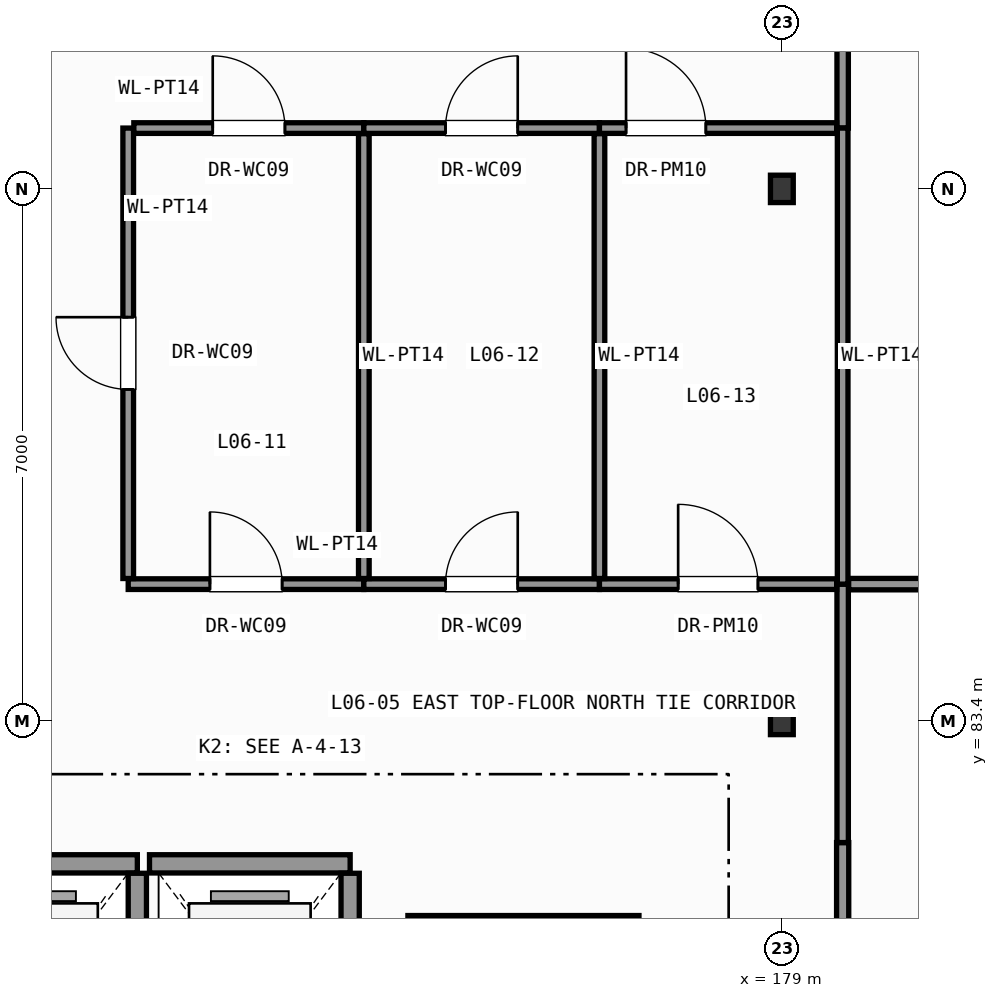
"""IFC4 building model, lengths in metres.
Left out: names, types, materials, properties, quantities, classifications, styles, units other than length and angle.
Written with IfcOpenShell. Run it as: python <this file> out.ifc"""

import sys

from ifc_helpers import new_model, si_unit, direction, frame, frame_2d, origin, origin_2d, place, context, subcontext, project, spatial, rectangle, i_section, extrude, element, fill, save


model = new_model("IFC4")
c1 = context("Model", 3, precision=1e-05, world=origin(), true_north=direction((0.0, 1.0)))
c2 = subcontext(c1, "Body", "Model", "MODEL_VIEW")
j1 = project(units=[si_unit("LENGTHUNIT", "METRE"), si_unit("PLANEANGLEUNIT", "RADIAN")], contexts=[c1])
p1 = place(None, origin())
s1 = spatial("IfcSite", under=j1, at=p1, CompositionType="ELEMENT")
p2 = place(p1, origin())
s2 = spatial("IfcBuilding", under=s1, at=p2, CompositionType="ELEMENT")
p3 = place(p2, frame((0.0, 0.0, 26.4)))
s3 = spatial("IfcBuildingStorey", under=s2, at=p3, CompositionType="ELEMENT", Elevation=26.4)
for number, where, z_axis, x_axis in (
    (1, (179.0, 83.4, 0.0), (0.0, 0.0, 1.0), (1.0, 0.0, 0.0)),
    (2, (179.0, 90.4, 0.0), (0.0, 0.0, 1.0), (1.0, 0.0, 0.0)),
):
    element("IfcColumn", number, at=place(p3, frame(where, z_axis=z_axis, x_axis=x_axis)), inside=s3, PredefinedType="COLUMN", context=c2, shape_type="SweptSolid", body=[
        extrude(i_section(OverallWidth=0.3, OverallDepth=0.36, WebThickness=0.012, FlangeThickness=0.022, FilletRadius=0.027, at=origin_2d()), origin(), (0.0, 0.0, 1.0), 4.2),
    ])
p4 = place(p3, frame((167.88, 81.52, 0.0), z_axis=(0.0, 0.0, 1.0), x_axis=(1.0, 0.0, 0.0)))
e3 = element("IfcWall", 3, at=p4, inside=s3, PredefinedType="SHEAR", context=c2, shape_type="SweptSolid", body=[
    extrude(rectangle(XDim=2.64, YDim=0.24, at=frame_2d((1.32, 0.0))), origin(), (0.0, 0.0, 1.0), 4.0),
])
p5 = place(p3, frame((170.52, 78.204, 0.0), z_axis=(0.0, 0.0, 1.0), x_axis=(0.0, 1.0, 0.0)))
e4 = element("IfcWall", 4, at=p5, inside=s3, PredefinedType="SHEAR", context=c2, shape_type="SweptSolid", body=[
    extrude(rectangle(XDim=3.192, YDim=0.24, at=frame_2d((1.596, 0.0))), origin(), (0.0, 0.0, 1.0), 4.0),
])
p6 = place(p3, frame((170.68, 81.52, 0.0), z_axis=(0.0, 0.0, 1.0), x_axis=(1.0, 0.0, 0.0)))
e5 = element("IfcWall", 5, at=p6, inside=s3, PredefinedType="SHEAR", context=c2, shape_type="SweptSolid", body=[
    extrude(rectangle(XDim=2.64, YDim=0.24, at=frame_2d((1.32, 0.0))), origin(), (0.0, 0.0, 1.0), 4.0),
])
p7 = place(p3, frame((173.32, 78.204, 0.0), z_axis=(0.0, 0.0, 1.0), x_axis=(0.0, 1.0, 0.0)))
e6 = element("IfcWall", 6, at=p7, inside=s3, PredefinedType="SHEAR", context=c2, shape_type="SweptSolid", body=[
    extrude(rectangle(XDim=3.192, YDim=0.24, at=frame_2d((1.596, 0.0))), origin(), (0.0, 0.0, 1.0), 4.0),
])
p8 = place(p3, frame((174.08, 80.72, 0.0), z_axis=(0.0, 0.0, 1.0), x_axis=(1.0, 0.0, 0.0)))
e7 = element("IfcWall", 7, at=p8, inside=s3, PredefinedType="SHEAR", context=c2, shape_type="SweptSolid", body=[
    extrude(rectangle(XDim=3.04, YDim=0.24, at=frame_2d((1.52, 0.0))), origin(), (0.0, 0.0, 1.0), 4.0),
])
p9 = place(p3, frame((179.8, 73.5, 0.0), z_axis=(0.0, 0.0, 1.0), x_axis=(0.0, 1.0, 0.0)))
e8 = element("IfcWall", 8, at=p9, inside=s3, PredefinedType="PARTITIONING", context=c2, shape_type="SweptSolid", body=[
    extrude(rectangle(XDim=8.3, YDim=0.16, at=frame_2d((4.15, 0.0))), origin(), (0.0, 0.0, 1.0), 4.0),
])
p10 = place(p9, frame((4.31, 0.0, 0.0)))
e9 = element("IfcOpeningElement", 9, at=p10, cuts=e8, PredefinedType="OPENING", context=c2, shape_type="SweptSolid", body=[
    extrude(rectangle(XDim=2.2, YDim=2.6, at=frame_2d((1.1, 1.3))), frame((0.0, 0.09, 0.0), z_axis=(0.0, -1.0, 0.0), x_axis=(1.0, 0.0, 0.0)), (0.0, 0.0, 1.0), 0.18),
])
p11 = place(p3, frame((179.8, 81.8, 0.0), z_axis=(0.0, 0.0, 1.0), x_axis=(0.0, 1.0, 0.0)))
e10 = element("IfcWall", 10, at=p11, inside=s3, PredefinedType="PARTITIONING", context=c2, shape_type="SweptSolid", body=[
    extrude(rectangle(XDim=3.4, YDim=0.15, at=frame_2d((1.7, 0.0))), origin(), (0.0, 0.0, 1.0), 4.0),
])
p12 = place(p3, frame((170.4, 85.2, 0.0), z_axis=(0.0, 0.0, 1.0), x_axis=(1.0, 0.0, 0.0)))
e11 = element("IfcWall", 11, at=p12, inside=s3, PredefinedType="PARTITIONING", context=c2, shape_type="SweptSolid", body=[
    extrude(rectangle(XDim=3.1, YDim=0.14, at=frame_2d((1.55, 0.0))), origin(), (0.0, 0.0, 1.0), 4.0),
])
p13 = place(p12, frame((1.075, 0.0, 0.0)))
e12 = element("IfcOpeningElement", 12, at=p13, cuts=e11, PredefinedType="OPENING", context=c2, shape_type="SweptSolid", body=[
    extrude(rectangle(XDim=0.95, YDim=2.1, at=frame_2d((0.475, 1.05))), frame((0.0, 0.08, 0.0), z_axis=(0.0, -1.0, 0.0), x_axis=(1.0, 0.0, 0.0)), (0.0, 0.0, 1.0), 0.16),
])
p14 = place(p3, frame((173.5, 85.2, 0.0), z_axis=(0.0, 0.0, 1.0), x_axis=(1.0, 0.0, 0.0)))
e13 = element("IfcWall", 13, at=p14, inside=s3, PredefinedType="PARTITIONING", context=c2, shape_type="SweptSolid", body=[
    extrude(rectangle(XDim=3.1, YDim=0.14, at=frame_2d((1.55, 0.0))), origin(), (0.0, 0.0, 1.0), 4.0),
])
p15 = place(p14, frame((1.075, 0.0, 0.0)))
e14 = element("IfcOpeningElement", 14, at=p15, cuts=e13, PredefinedType="OPENING", context=c2, shape_type="SweptSolid", body=[
    extrude(rectangle(XDim=0.95, YDim=2.1, at=frame_2d((0.475, 1.05))), frame((0.0, 0.08, 0.0), z_axis=(0.0, -1.0, 0.0), x_axis=(1.0, 0.0, 0.0)), (0.0, 0.0, 1.0), 0.16),
])
p16 = place(p3, frame((176.6, 85.2, 0.0), z_axis=(0.0, 0.0, 1.0), x_axis=(1.0, 0.0, 0.0)))
e15 = element("IfcWall", 15, at=p16, inside=s3, PredefinedType="PARTITIONING", context=c2, shape_type="SweptSolid", body=[
    extrude(rectangle(XDim=3.121, YDim=0.14, at=frame_2d((1.561, 0.0))), origin(), (0.0, 0.0, 1.0), 4.0),
])
p17 = place(p16, frame((1.035, 0.0, 0.0)))
e16 = element("IfcOpeningElement", 16, at=p17, cuts=e15, PredefinedType="OPENING", context=c2, shape_type="SweptSolid", body=[
    extrude(rectangle(XDim=1.05, YDim=2.15, at=frame_2d((0.525, 1.075))), frame((0.0, 0.08, 0.0), z_axis=(0.0, -1.0, 0.0), x_axis=(1.0, 0.0, 0.0)), (0.0, 0.0, 1.0), 0.16),
])
p18 = place(p3, frame((170.4, 85.274, 0.0), z_axis=(0.0, 0.0, 1.0), x_axis=(0.0, 1.0, 0.0)))
e17 = element("IfcWall", 17, at=p18, inside=s3, PredefinedType="PARTITIONING", context=c2, shape_type="SweptSolid", body=[
    extrude(rectangle(XDim=5.926, YDim=0.14, at=frame_2d((2.963, 0.0))), origin(), (0.0, 0.0, 1.0), 4.0),
])
p19 = place(p18, frame((2.488, 0.0, 0.0)))
e18 = element("IfcOpeningElement", 18, at=p19, cuts=e17, PredefinedType="OPENING", context=c2, shape_type="SweptSolid", body=[
    extrude(rectangle(XDim=0.95, YDim=2.1, at=frame_2d((0.475, 1.05))), frame((0.0, 0.08, 0.0), z_axis=(0.0, -1.0, 0.0), x_axis=(1.0, 0.0, 0.0)), (0.0, 0.0, 1.0), 0.16),
])
p20 = place(p3, frame((179.8, 91.2, 0.0), z_axis=(0.0, 0.0, 1.0), x_axis=(0.0, 1.0, 0.0)))
e19 = element("IfcWall", 19, at=p20, inside=s3, PredefinedType="PARTITIONING", context=c2, shape_type="SweptSolid", body=[
    extrude(rectangle(XDim=3.4, YDim=0.15, at=frame_2d((1.7, 0.0))), origin(), (0.0, 0.0, 1.0), 4.0),
])
p21 = place(p20, frame((1.2, 0.0, 0.0)))
e20 = element("IfcOpeningElement", 20, at=p21, cuts=e19, PredefinedType="OPENING", context=c2, shape_type="SweptSolid", body=[
    extrude(rectangle(XDim=1.0, YDim=2.15, at=frame_2d((0.5, 1.075))), frame((0.0, 0.085, 0.0), z_axis=(0.0, -1.0, 0.0), x_axis=(1.0, 0.0, 0.0)), (0.0, 0.0, 1.0), 0.17),
])
p22 = place(p3, frame((170.474, 91.2, 0.0), z_axis=(0.0, 0.0, 1.0), x_axis=(1.0, 0.0, 0.0)))
e21 = element("IfcWall", 21, at=p22, inside=s3, PredefinedType="PARTITIONING", context=c2, shape_type="SweptSolid", body=[
    extrude(rectangle(XDim=3.026, YDim=0.14, at=frame_2d((1.513, 0.0))), origin(), (0.0, 0.0, 1.0), 4.0),
])
p23 = place(p22, frame((1.038, 0.0, 0.0)))
e22 = element("IfcOpeningElement", 22, at=p23, cuts=e21, PredefinedType="OPENING", context=c2, shape_type="SweptSolid", body=[
    extrude(rectangle(XDim=0.95, YDim=2.1, at=frame_2d((0.475, 1.05))), frame((0.0, 0.08, 0.0), z_axis=(0.0, -1.0, 0.0), x_axis=(1.0, 0.0, 0.0)), (0.0, 0.0, 1.0), 0.16),
])
p24 = place(p3, frame((173.5, 91.2, 0.0), z_axis=(0.0, 0.0, 1.0), x_axis=(1.0, 0.0, 0.0)))
e23 = element("IfcWall", 23, at=p24, inside=s3, PredefinedType="PARTITIONING", context=c2, shape_type="SweptSolid", body=[
    extrude(rectangle(XDim=3.1, YDim=0.14, at=frame_2d((1.55, 0.0))), origin(), (0.0, 0.0, 1.0), 4.0),
])
p25 = place(p24, frame((1.075, 0.0, 0.0)))
e24 = element("IfcOpeningElement", 24, at=p25, cuts=e23, PredefinedType="OPENING", context=c2, shape_type="SweptSolid", body=[
    extrude(rectangle(XDim=0.95, YDim=2.1, at=frame_2d((0.475, 1.05))), frame((0.0, 0.08, 0.0), z_axis=(0.0, -1.0, 0.0), x_axis=(1.0, 0.0, 0.0)), (0.0, 0.0, 1.0), 0.16),
])
p26 = place(p3, frame((176.6, 91.2, 0.0), z_axis=(0.0, 0.0, 1.0), x_axis=(1.0, 0.0, 0.0)))
e25 = element("IfcWall", 25, at=p26, inside=s3, PredefinedType="PARTITIONING", context=c2, shape_type="SweptSolid", body=[
    extrude(rectangle(XDim=3.121, YDim=0.14, at=frame_2d((1.561, 0.0))), origin(), (0.0, 0.0, 1.0), 4.0),
])
p27 = place(p26, frame((0.35, 0.0, 0.0)))
e26 = element("IfcOpeningElement", 26, at=p27, cuts=e25, PredefinedType="OPENING", context=c2, shape_type="SweptSolid", body=[
    extrude(rectangle(XDim=1.05, YDim=2.15, at=frame_2d((0.525, 1.075))), frame((0.0, 0.08, 0.0), z_axis=(0.0, -1.0, 0.0), x_axis=(1.0, 0.0, 0.0)), (0.0, 0.0, 1.0), 0.16),
])
p28 = place(p3, frame((179.879, 85.2, 0.0), z_axis=(0.0, 0.0, 1.0), x_axis=(1.0, 0.0, 0.0)))
e27 = element("IfcWall", 27, at=p28, inside=s3, PredefinedType="PARTITIONING", context=c2, shape_type="SweptSolid", body=[
    extrude(rectangle(XDim=17.977, YDim=0.15, at=frame_2d((8.989, 0.0))), origin(), (0.0, 0.0, 1.0), 4.0),
])
p29 = place(p3, frame((179.8, 85.2, 0.0), z_axis=(0.0, 0.0, 1.0), x_axis=(0.0, 1.0, 0.0)))
e28 = element("IfcWall", 28, at=p29, inside=s3, PredefinedType="PARTITIONING", context=c2, shape_type="SweptSolid", body=[
    extrude(rectangle(XDim=6.0, YDim=0.14, at=frame_2d((3.0, 0.0))), origin(), (0.0, 0.0, 1.0), 4.0),
])
for number, where, z_axis, x_axis in (
    (29, (173.5, 85.274, 0.0), (0.0, 0.0, 1.0), (0.0, 1.0, 0.0)),
    (30, (176.6, 85.274, 0.0), (0.0, 0.0, 1.0), (0.0, 1.0, 0.0)),
):
    element("IfcWall", number, at=place(p3, frame(where, z_axis=z_axis, x_axis=x_axis)), inside=s3, PredefinedType="PARTITIONING", context=c2, shape_type="SweptSolid", body=[
        extrude(rectangle(XDim=5.852, YDim=0.14, at=frame_2d((2.926, 0.0))), origin(), (0.0, 0.0, 1.0), 4.0),
    ])
p30 = place(p13, origin())
e31 = element("IfcDoor", 31, at=p30, inside=s3, OperationType="SINGLE_SWING_LEFT", PredefinedType="DOOR", context=c2, shape_type="SweptSolid", body=[
    extrude(rectangle(XDim=0.95, YDim=2.1, at=frame_2d((0.475, 1.05))), frame((0.0, 0.025, 0.0), z_axis=(0.0, -1.0, 0.0), x_axis=(1.0, 0.0, 0.0)), (0.0, 0.0, 1.0), 0.05),
])
fill(e12, e31)
p31 = place(p15, origin())
e32 = element("IfcDoor", 32, at=p31, inside=s3, OperationType="SINGLE_SWING_RIGHT", PredefinedType="DOOR", context=c2, shape_type="SweptSolid", body=[
    extrude(rectangle(XDim=0.95, YDim=2.1, at=frame_2d((0.475, 1.05))), frame((0.0, 0.025, 0.0), z_axis=(0.0, -1.0, 0.0), x_axis=(1.0, 0.0, 0.0)), (0.0, 0.0, 1.0), 0.05),
])
fill(e14, e32)
p32 = place(p17, origin())
e33 = element("IfcDoor", 33, at=p32, inside=s3, OperationType="SINGLE_SWING_LEFT", PredefinedType="DOOR", context=c2, shape_type="SweptSolid", body=[
    extrude(rectangle(XDim=1.05, YDim=2.15, at=frame_2d((0.525, 1.075))), frame((0.0, 0.025, 0.0), z_axis=(0.0, -1.0, 0.0), x_axis=(1.0, 0.0, 0.0)), (0.0, 0.0, 1.0), 0.05),
])
fill(e16, e33)
p33 = place(p19, origin())
e34 = element("IfcDoor", 34, at=p33, inside=s3, OperationType="SINGLE_SWING_RIGHT", PredefinedType="DOOR", context=c2, shape_type="SweptSolid", body=[
    extrude(rectangle(XDim=0.95, YDim=2.1, at=frame_2d((0.475, 1.05))), frame((0.0, 0.025, 0.0), z_axis=(0.0, -1.0, 0.0), x_axis=(1.0, 0.0, 0.0)), (0.0, 0.0, 1.0), 0.05),
])
fill(e18, e34)
p34 = place(p23, origin())
e35 = element("IfcDoor", 35, at=p34, inside=s3, OperationType="SINGLE_SWING_LEFT", PredefinedType="DOOR", context=c2, shape_type="SweptSolid", body=[
    extrude(rectangle(XDim=0.95, YDim=2.1, at=frame_2d((0.475, 1.05))), frame((0.0, 0.025, 0.0), z_axis=(0.0, -1.0, 0.0), x_axis=(1.0, 0.0, 0.0)), (0.0, 0.0, 1.0), 0.05),
])
fill(e22, e35)
p35 = place(p25, origin())
e36 = element("IfcDoor", 36, at=p35, inside=s3, OperationType="SINGLE_SWING_RIGHT", PredefinedType="DOOR", context=c2, shape_type="SweptSolid", body=[
    extrude(rectangle(XDim=0.95, YDim=2.1, at=frame_2d((0.475, 1.05))), frame((0.0, 0.025, 0.0), z_axis=(0.0, -1.0, 0.0), x_axis=(1.0, 0.0, 0.0)), (0.0, 0.0, 1.0), 0.05),
])
fill(e24, e36)
p36 = place(p27, origin())
e37 = element("IfcDoor", 37, at=p36, inside=s3, OperationType="SINGLE_SWING_LEFT", PredefinedType="DOOR", context=c2, shape_type="SweptSolid", body=[
    extrude(rectangle(XDim=1.05, YDim=2.15, at=frame_2d((0.525, 1.075))), frame((0.0, 0.025, 0.0), z_axis=(0.0, -1.0, 0.0), x_axis=(1.0, 0.0, 0.0)), (0.0, 0.0, 1.0), 0.05),
])
fill(e26, e37)
save(model, sys.argv[1])
